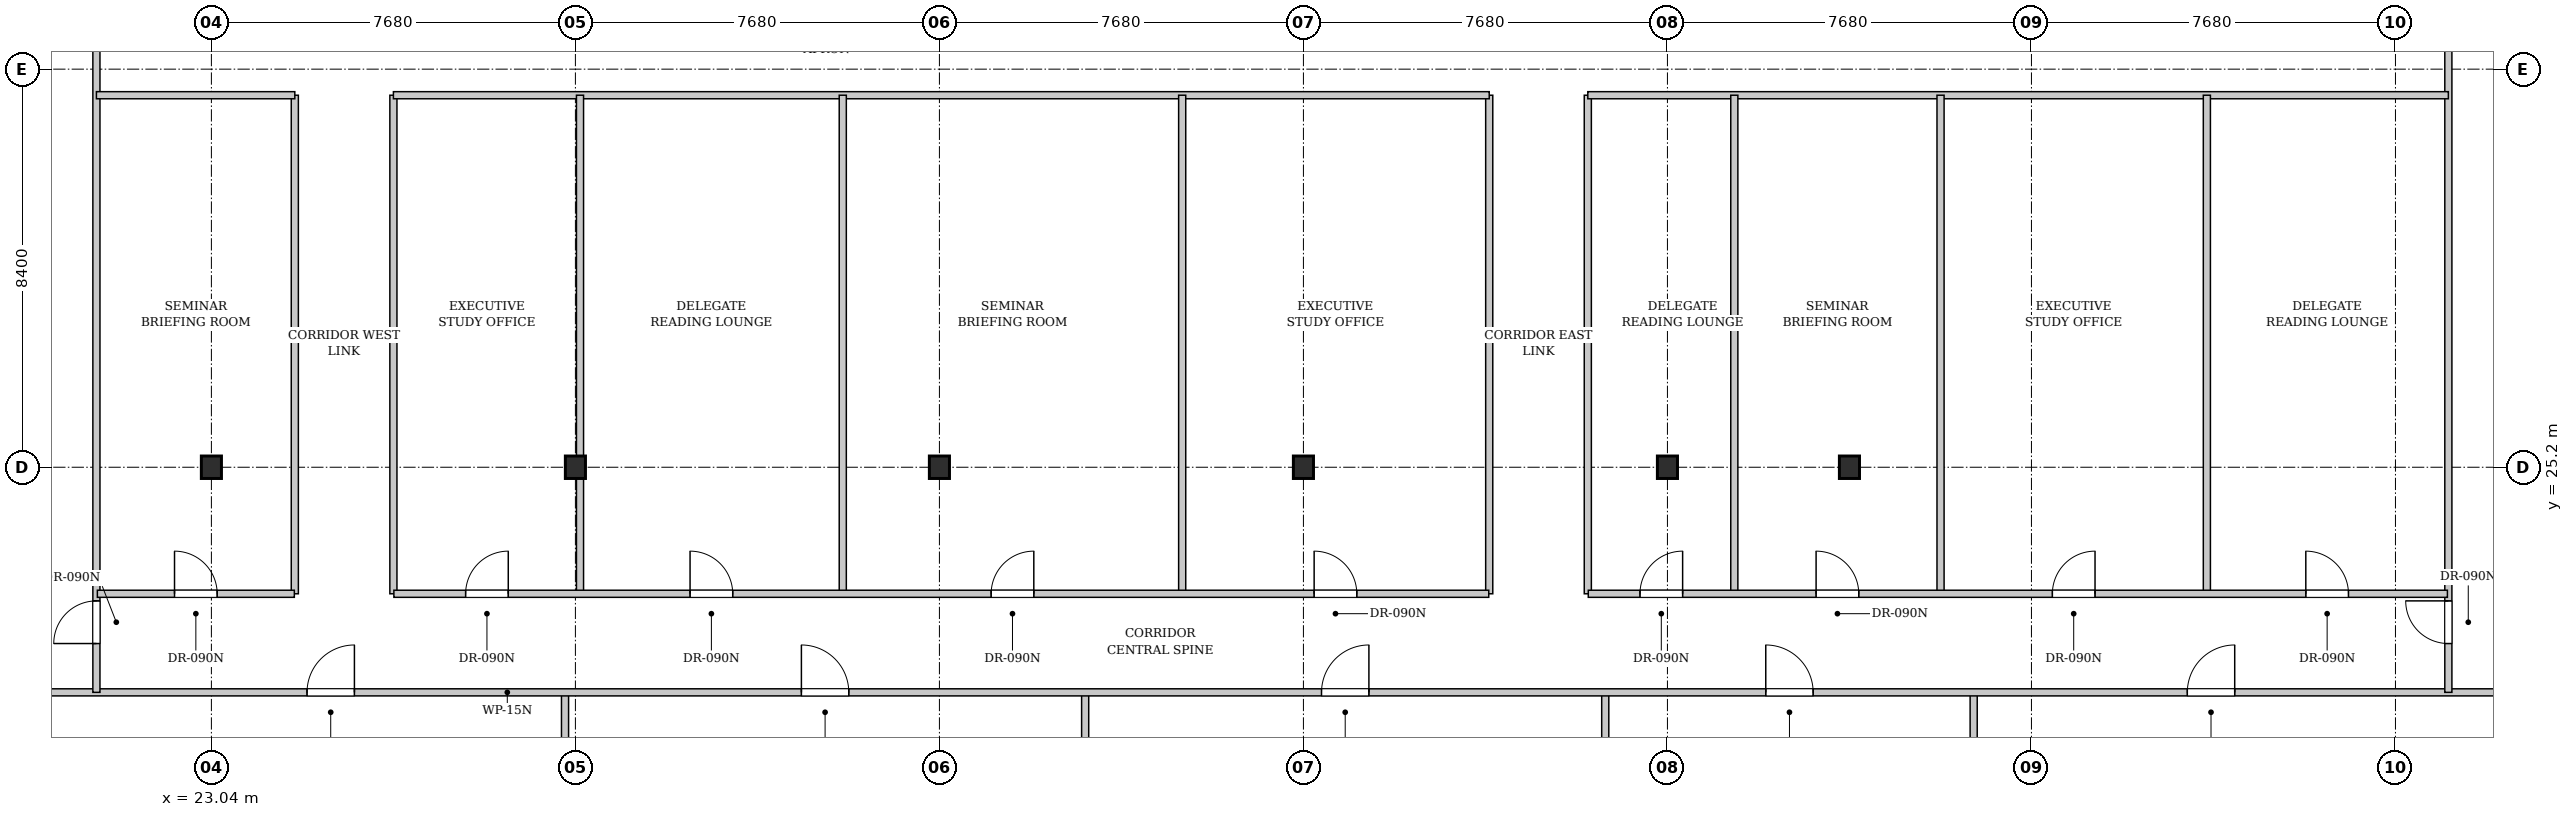
"""IFC4 building model, lengths in metres.
Left out: names, types, materials, properties, quantities, classifications, styles, units other than length and angle.
Written with IfcOpenShell. Run it as: python <this file> out.ifc"""

import sys

from ifc_helpers import new_model, si_unit, direction, frame, frame_2d, origin, origin_2d, place, context, subcontext, project, spatial, rectangle, i_section, extrude, element, fill, save


model = new_model("IFC4")
c1 = context("Model", 3, precision=1e-05, world=origin(), true_north=direction((0.0, 1.0)))
c2 = subcontext(c1, "Body", "Model", "MODEL_VIEW")
j1 = project(units=[si_unit("LENGTHUNIT", "METRE"), si_unit("PLANEANGLEUNIT", "RADIAN")], contexts=[c1])
p1 = place(None, origin())
s1 = spatial("IfcSite", under=j1, at=p1, CompositionType="ELEMENT")
p2 = place(p1, origin())
s2 = spatial("IfcBuilding", under=s1, at=p2, CompositionType="ELEMENT")
p3 = place(p2, frame((0.0, 0.0, 123.7)))
s3 = spatial("IfcBuildingStorey", under=s2, at=p3, CompositionType="ELEMENT", Elevation=123.7)
for number, where, z_axis, x_axis in (
    (1, (23.04, 25.2, 0.0), (0.0, 0.0, 1.0), (1.0, 0.0, 0.0)),
    (2, (30.72, 25.2, 0.0), (0.0, 0.0, 1.0), (1.0, 0.0, 0.0)),
    (3, (38.4, 25.2, 0.0), (0.0, 0.0, 1.0), (1.0, 0.0, 0.0)),
    (4, (46.08, 25.2, 0.0), (0.0, 0.0, 1.0), (1.0, 0.0, 0.0)),
    (5, (53.76, 25.2, 0.0), (0.0, 0.0, 1.0), (1.0, 0.0, 0.0)),
    (6, (57.6, 25.2, 0.0), (0.0, 0.0, 1.0), (1.0, 0.0, 0.0)),
):
    element("IfcColumn", number, at=place(p3, frame(where, z_axis=z_axis, x_axis=x_axis)), inside=s3, PredefinedType="COLUMN", context=c2, shape_type="SweptSolid", body=[
        extrude(i_section(OverallWidth=0.424, OverallDepth=0.474, WebThickness=0.047, FlangeThickness=0.077, FilletRadius=0.015, at=origin_2d()), origin(), (0.0, 0.0, 1.0), 3.4),
    ])
p4 = place(p3, frame((30.501, 9.604, 0.0), z_axis=(0.0, 0.0, 1.0), x_axis=(0.0, 1.0, 0.0)))
e7 = element("IfcWall", 7, at=p4, inside=s3, PredefinedType="PARTITIONING", context=c2, shape_type="SweptSolid", body=[
    extrude(rectangle(XDim=10.866, YDim=0.15, at=frame_2d((5.433, 0.0))), origin(), (0.0, 0.0, 1.0), 3.18),
])
p5 = place(p3, frame((41.475, 10.66, 0.0), z_axis=(0.0, 0.0, 1.0), x_axis=(0.0, 1.0, 0.0)))
e8 = element("IfcWall", 8, at=p5, inside=s3, PredefinedType="PARTITIONING", context=c2, shape_type="SweptSolid", body=[
    extrude(rectangle(XDim=9.81, YDim=0.15, at=frame_2d((4.905, 0.0))), origin(), (0.0, 0.0, 1.0), 3.18),
])
p6 = place(p3, frame((52.448, 11.717, 0.0), z_axis=(0.0, 0.0, 1.0), x_axis=(0.0, 1.0, 0.0)))
e9 = element("IfcWall", 9, at=p6, inside=s3, PredefinedType="PARTITIONING", context=c2, shape_type="SweptSolid", body=[
    extrude(rectangle(XDim=8.753, YDim=0.15, at=frame_2d((4.376, 0.0))), origin(), (0.0, 0.0, 1.0), 2.525),
])
p7 = place(p3, frame((60.221, 12.465, 0.0), z_axis=(0.0, 0.0, 1.0), x_axis=(0.0, 1.0, 0.0)))
e10 = element("IfcWall", 10, at=p7, inside=s3, PredefinedType="PARTITIONING", context=c2, shape_type="SweptSolid", body=[
    extrude(rectangle(XDim=8.005, YDim=0.15, at=frame_2d((4.002, 0.0))), origin(), (0.0, 0.0, 1.0), 3.18),
])
p8 = place(p3, frame((15.814, 20.45, 0.0), z_axis=(0.0, 0.0, 1.0), x_axis=(1.0, 0.0, 0.0)))
e11 = element("IfcWall", 11, at=p8, inside=s3, PredefinedType="PARTITIONING", context=c2, shape_type="SweptSolid", body=[
    extrude(rectangle(XDim=61.222, YDim=0.15, at=frame_2d((30.611, 0.0))), origin(), (0.0, 0.0, 1.0), 3.18),
])
p9 = place(p8, frame((9.243, 0.0, 0.0)))
e12 = element("IfcOpeningElement", 12, at=p9, cuts=e11, PredefinedType="OPENING", context=c2, shape_type="SweptSolid", body=[
    extrude(rectangle(XDim=1.0, YDim=2.15, at=frame_2d((0.5, 1.075))), frame((0.0, 0.085, 0.0), z_axis=(0.0, -1.0, 0.0), x_axis=(1.0, 0.0, 0.0)), (0.0, 0.0, 1.0), 0.17),
])
p10 = place(p8, frame((19.674, 0.0, 0.0)))
e13 = element("IfcOpeningElement", 13, at=p10, cuts=e11, PredefinedType="OPENING", context=c2, shape_type="SweptSolid", body=[
    extrude(rectangle(XDim=1.0, YDim=2.15, at=frame_2d((0.5, 1.075))), frame((0.0, 0.085, 0.0), z_axis=(0.0, -1.0, 0.0), x_axis=(1.0, 0.0, 0.0)), (0.0, 0.0, 1.0), 0.17),
])
p11 = place(p8, frame((30.647, 0.0, 0.0)))
e14 = element("IfcOpeningElement", 14, at=p11, cuts=e11, PredefinedType="OPENING", context=c2, shape_type="SweptSolid", body=[
    extrude(rectangle(XDim=1.0, YDim=2.15, at=frame_2d((0.5, 1.075))), frame((0.0, 0.085, 0.0), z_axis=(0.0, -1.0, 0.0), x_axis=(1.0, 0.0, 0.0)), (0.0, 0.0, 1.0), 0.17),
])
p12 = place(p8, frame((40.021, 0.0, 0.0)))
e15 = element("IfcOpeningElement", 15, at=p12, cuts=e11, PredefinedType="OPENING", context=c2, shape_type="SweptSolid", body=[
    extrude(rectangle(XDim=1.0, YDim=2.15, at=frame_2d((0.5, 1.075))), frame((0.0, 0.085, 0.0), z_axis=(0.0, -1.0, 0.0), x_axis=(1.0, 0.0, 0.0)), (0.0, 0.0, 1.0), 0.17),
])
p13 = place(p8, frame((48.914, 0.0, 0.0)))
e16 = element("IfcOpeningElement", 16, at=p13, cuts=e11, PredefinedType="OPENING", context=c2, shape_type="SweptSolid", body=[
    extrude(rectangle(XDim=1.0, YDim=2.15, at=frame_2d((0.5, 1.075))), frame((0.0, 0.085, 0.0), z_axis=(0.0, -1.0, 0.0), x_axis=(1.0, 0.0, 0.0)), (0.0, 0.0, 1.0), 0.17),
])
p14 = place(p3, frame((20.614, 20.45, 0.0), z_axis=(0.0, 0.0, 1.0), x_axis=(0.0, 1.0, 0.0)))
e17 = element("IfcWall", 17, at=p14, inside=s3, PredefinedType="PARTITIONING", context=c2, shape_type="SweptSolid", body=[
    extrude(rectangle(XDim=25.815, YDim=0.15, at=frame_2d((12.907, 0.0))), origin(), (0.0, 0.0, 1.0), 3.18),
])
p15 = place(p14, frame((1.03, 0.0, 0.0)))
e18 = element("IfcOpeningElement", 18, at=p15, cuts=e17, PredefinedType="OPENING", context=c2, shape_type="SweptSolid", body=[
    extrude(rectangle(XDim=0.9, YDim=2.15, at=frame_2d((0.45, 1.075))), frame((0.0, 0.085, 0.0), z_axis=(0.0, -1.0, 0.0), x_axis=(1.0, 0.0, 0.0)), (0.0, 0.0, 1.0), 0.17),
])
p16 = place(p3, frame((70.236, 20.45, 0.0), z_axis=(0.0, 0.0, 1.0), x_axis=(0.0, 1.0, 0.0)))
e19 = element("IfcWall", 19, at=p16, inside=s3, PredefinedType="PARTITIONING", context=c2, shape_type="SweptSolid", body=[
    extrude(rectangle(XDim=30.593, YDim=0.15, at=frame_2d((15.296, 0.0))), origin(), (0.0, 0.0, 1.0), 3.18),
])
p17 = place(p16, frame((1.03, 0.0, 0.0)))
e20 = element("IfcOpeningElement", 20, at=p17, cuts=e19, PredefinedType="OPENING", context=c2, shape_type="SweptSolid", body=[
    extrude(rectangle(XDim=0.9, YDim=2.15, at=frame_2d((0.45, 1.075))), frame((0.0, 0.085, 0.0), z_axis=(0.0, -1.0, 0.0), x_axis=(1.0, 0.0, 0.0)), (0.0, 0.0, 1.0), 0.17),
])
for number, where, z_axis, x_axis in (
    (21, (24.8, 22.53, 0.0), (0.0, 0.0, 1.0), (0.0, 1.0, 0.0)),
    (22, (26.88, 22.53, 0.0), (0.0, 0.0, 1.0), (0.0, 1.0, 0.0)),
    (23, (50.0, 22.53, 0.0), (0.0, 0.0, 1.0), (0.0, 1.0, 0.0)),
    (24, (52.08, 22.53, 0.0), (0.0, 0.0, 1.0), (0.0, 1.0, 0.0)),
):
    element("IfcWall", number, at=place(p3, frame(where, z_axis=z_axis, x_axis=x_axis)), inside=s3, PredefinedType="PARTITIONING", context=c2, shape_type="SweptSolid", body=[
        extrude(rectangle(XDim=10.52, YDim=0.15, at=frame_2d((5.26, 0.0))), origin(), (0.0, 0.0, 1.0), 3.18),
    ])
p18 = place(p3, frame((20.614, 33.05, 0.0), z_axis=(0.0, 0.0, 1.0), x_axis=(1.0, 0.0, 0.0)))
e25 = element("IfcWall", 25, at=p18, inside=s3, PredefinedType="PARTITIONING", context=c2, shape_type="SweptSolid", body=[
    extrude(rectangle(XDim=4.186, YDim=0.15, at=frame_2d((2.093, 0.0))), origin(), (0.0, 0.0, 1.0), 3.18),
])
p19 = place(p3, frame((26.88, 33.05, 0.0), z_axis=(0.0, 0.0, 1.0), x_axis=(1.0, 0.0, 0.0)))
e26 = element("IfcWall", 26, at=p19, inside=s3, PredefinedType="PARTITIONING", context=c2, shape_type="SweptSolid", body=[
    extrude(rectangle(XDim=23.12, YDim=0.15, at=frame_2d((11.56, 0.0))), origin(), (0.0, 0.0, 1.0), 3.18),
])
p20 = place(p3, frame((52.08, 33.05, 0.0), z_axis=(0.0, 0.0, 1.0), x_axis=(1.0, 0.0, 0.0)))
e27 = element("IfcWall", 27, at=p20, inside=s3, PredefinedType="PARTITIONING", context=c2, shape_type="SweptSolid", body=[
    extrude(rectangle(XDim=18.156, YDim=0.15, at=frame_2d((9.078, 0.0))), origin(), (0.0, 0.0, 1.0), 2.525),
])
p21 = place(p3, frame((20.634, 22.53, 0.0), z_axis=(0.0, 0.0, 1.0), x_axis=(1.0, 0.0, 0.0)))
e28 = element("IfcWall", 28, at=p21, inside=s3, PredefinedType="PARTITIONING", context=c2, shape_type="SweptSolid", body=[
    extrude(rectangle(XDim=4.156, YDim=0.15, at=frame_2d((2.078, 0.0))), origin(), (0.0, 0.0, 1.0), 3.18),
])
p22 = place(p21, frame((1.628, 0.0, 0.0)))
e29 = element("IfcOpeningElement", 29, at=p22, cuts=e28, PredefinedType="OPENING", context=c2, shape_type="SweptSolid", body=[
    extrude(rectangle(XDim=0.9, YDim=2.15, at=frame_2d((0.45, 1.075))), frame((0.0, 0.085, 0.0), z_axis=(0.0, -1.0, 0.0), x_axis=(1.0, 0.0, 0.0)), (0.0, 0.0, 1.0), 0.17),
])
p23 = place(p3, frame((30.817, 22.53, 0.0), z_axis=(0.0, 0.0, 1.0), x_axis=(0.0, 1.0, 0.0)))
e30 = element("IfcWall", 30, at=p23, inside=s3, PredefinedType="PARTITIONING", context=c2, shape_type="SweptSolid", body=[
    extrude(rectangle(XDim=10.52, YDim=0.15, at=frame_2d((5.26, 0.0))), origin(), (0.0, 0.0, 1.0), 2.525),
])
for number, where, z_axis, x_axis in (
    (31, (36.361, 22.53, 0.0), (0.0, 0.0, 1.0), (0.0, 1.0, 0.0)),
    (32, (43.522, 22.53, 0.0), (0.0, 0.0, 1.0), (0.0, 1.0, 0.0)),
):
    element("IfcWall", number, at=place(p3, frame(where, z_axis=z_axis, x_axis=x_axis)), inside=s3, PredefinedType="PARTITIONING", context=c2, shape_type="SweptSolid", body=[
        extrude(rectangle(XDim=10.52, YDim=0.15, at=frame_2d((5.26, 0.0))), origin(), (0.0, 0.0, 1.0), 3.18),
    ])
p24 = place(p3, frame((26.89, 22.53, 0.0), z_axis=(0.0, 0.0, 1.0), x_axis=(1.0, 0.0, 0.0)))
e33 = element("IfcWall", 33, at=p24, inside=s3, PredefinedType="PARTITIONING", context=c2, shape_type="SweptSolid", body=[
    extrude(rectangle(XDim=23.1, YDim=0.15, at=frame_2d((11.55, 0.0))), origin(), (0.0, 0.0, 1.0), 3.18),
])
p25 = place(p24, frame((1.513, 0.0, 0.0)))
e34 = element("IfcOpeningElement", 34, at=p25, cuts=e33, PredefinedType="OPENING", context=c2, shape_type="SweptSolid", body=[
    extrude(rectangle(XDim=0.9, YDim=2.15, at=frame_2d((0.45, 1.075))), frame((0.0, 0.085, 0.0), z_axis=(0.0, -1.0, 0.0), x_axis=(1.0, 0.0, 0.0)), (0.0, 0.0, 1.0), 0.17),
])
p26 = place(p24, frame((6.249, 0.0, 0.0)))
e35 = element("IfcOpeningElement", 35, at=p26, cuts=e33, PredefinedType="OPENING", context=c2, shape_type="SweptSolid", body=[
    extrude(rectangle(XDim=0.9, YDim=2.15, at=frame_2d((0.45, 1.075))), frame((0.0, 0.085, 0.0), z_axis=(0.0, -1.0, 0.0), x_axis=(1.0, 0.0, 0.0)), (0.0, 0.0, 1.0), 0.17),
])
p27 = place(p24, frame((12.602, 0.0, 0.0)))
e36 = element("IfcOpeningElement", 36, at=p27, cuts=e33, PredefinedType="OPENING", context=c2, shape_type="SweptSolid", body=[
    extrude(rectangle(XDim=0.9, YDim=2.15, at=frame_2d((0.45, 1.075))), frame((0.0, 0.085, 0.0), z_axis=(0.0, -1.0, 0.0), x_axis=(1.0, 0.0, 0.0)), (0.0, 0.0, 1.0), 0.17),
])
p28 = place(p24, frame((19.416, 0.0, 0.0)))
e37 = element("IfcOpeningElement", 37, at=p28, cuts=e33, PredefinedType="OPENING", context=c2, shape_type="SweptSolid", body=[
    extrude(rectangle(XDim=0.9, YDim=2.15, at=frame_2d((0.45, 1.075))), frame((0.0, 0.085, 0.0), z_axis=(0.0, -1.0, 0.0), x_axis=(1.0, 0.0, 0.0)), (0.0, 0.0, 1.0), 0.17),
])
for number, where, z_axis, x_axis in (
    (38, (55.171, 22.53, 0.0), (0.0, 0.0, 1.0), (0.0, 1.0, 0.0)),
    (39, (59.522, 22.53, 0.0), (0.0, 0.0, 1.0), (0.0, 1.0, 0.0)),
    (40, (65.141, 22.53, 0.0), (0.0, 0.0, 1.0), (0.0, 1.0, 0.0)),
):
    element("IfcWall", number, at=place(p3, frame(where, z_axis=z_axis, x_axis=x_axis)), inside=s3, PredefinedType="PARTITIONING", context=c2, shape_type="SweptSolid", body=[
        extrude(rectangle(XDim=10.52, YDim=0.15, at=frame_2d((5.26, 0.0))), origin(), (0.0, 0.0, 1.0), 3.18),
    ])
p29 = place(p3, frame((52.09, 22.53, 0.0), z_axis=(0.0, 0.0, 1.0), x_axis=(1.0, 0.0, 0.0)))
e41 = element("IfcWall", 41, at=p29, inside=s3, PredefinedType="PARTITIONING", context=c2, shape_type="SweptSolid", body=[
    extrude(rectangle(XDim=18.126, YDim=0.15, at=frame_2d((9.063, 0.0))), origin(), (0.0, 0.0, 1.0), 3.18),
])
p30 = place(p29, frame((1.091, 0.0, 0.0)))
e42 = element("IfcOpeningElement", 42, at=p30, cuts=e41, PredefinedType="OPENING", context=c2, shape_type="SweptSolid", body=[
    extrude(rectangle(XDim=0.9, YDim=2.15, at=frame_2d((0.45, 1.075))), frame((0.0, 0.085, 0.0), z_axis=(0.0, -1.0, 0.0), x_axis=(1.0, 0.0, 0.0)), (0.0, 0.0, 1.0), 0.17),
])
p31 = place(p29, frame((4.806, 0.0, 0.0)))
e43 = element("IfcOpeningElement", 43, at=p31, cuts=e41, PredefinedType="OPENING", context=c2, shape_type="SweptSolid", body=[
    extrude(rectangle(XDim=0.9, YDim=2.15, at=frame_2d((0.45, 1.075))), frame((0.0, 0.085, 0.0), z_axis=(0.0, -1.0, 0.0), x_axis=(1.0, 0.0, 0.0)), (0.0, 0.0, 1.0), 0.17),
])
p32 = place(p29, frame((9.792, 0.0, 0.0)))
e44 = element("IfcOpeningElement", 44, at=p32, cuts=e41, PredefinedType="OPENING", context=c2, shape_type="SweptSolid", body=[
    extrude(rectangle(XDim=0.9, YDim=2.15, at=frame_2d((0.45, 1.075))), frame((0.0, 0.085, 0.0), z_axis=(0.0, -1.0, 0.0), x_axis=(1.0, 0.0, 0.0)), (0.0, 0.0, 1.0), 0.17),
])
p33 = place(p29, frame((15.138, 0.0, 0.0)))
e45 = element("IfcOpeningElement", 45, at=p33, cuts=e41, PredefinedType="OPENING", context=c2, shape_type="SweptSolid", body=[
    extrude(rectangle(XDim=0.9, YDim=2.15, at=frame_2d((0.45, 1.075))), frame((0.0, 0.085, 0.0), z_axis=(0.0, -1.0, 0.0), x_axis=(1.0, 0.0, 0.0)), (0.0, 0.0, 1.0), 0.17),
])
p34 = place(p9, origin())
e46 = element("IfcDoor", 46, at=p34, inside=s3, OperationType="SINGLE_SWING_RIGHT", PredefinedType="DOOR", context=c2, shape_type="SweptSolid", body=[
    extrude(rectangle(XDim=1.0, YDim=2.15, at=frame_2d((0.5, 1.075))), frame((0.0, 0.025, 0.0), z_axis=(0.0, -1.0, 0.0), x_axis=(1.0, 0.0, 0.0)), (0.0, 0.0, 1.0), 0.05),
])
fill(e12, e46)
p35 = place(p10, origin())
e47 = element("IfcDoor", 47, at=p35, inside=s3, OperationType="SINGLE_SWING_LEFT", PredefinedType="DOOR", context=c2, shape_type="SweptSolid", body=[
    extrude(rectangle(XDim=1.0, YDim=2.15, at=frame_2d((0.5, 1.075))), frame((0.0, 0.025, 0.0), z_axis=(0.0, -1.0, 0.0), x_axis=(1.0, 0.0, 0.0)), (0.0, 0.0, 1.0), 0.05),
])
fill(e13, e47)
p36 = place(p11, origin())
e48 = element("IfcDoor", 48, at=p36, inside=s3, OperationType="SINGLE_SWING_RIGHT", PredefinedType="DOOR", context=c2, shape_type="SweptSolid", body=[
    extrude(rectangle(XDim=1.0, YDim=2.15, at=frame_2d((0.5, 1.075))), frame((0.0, 0.025, 0.0), z_axis=(0.0, -1.0, 0.0), x_axis=(1.0, 0.0, 0.0)), (0.0, 0.0, 1.0), 0.05),
])
fill(e14, e48)
p37 = place(p12, origin())
e49 = element("IfcDoor", 49, at=p37, inside=s3, OperationType="SINGLE_SWING_LEFT", PredefinedType="DOOR", context=c2, shape_type="SweptSolid", body=[
    extrude(rectangle(XDim=1.0, YDim=2.15, at=frame_2d((0.5, 1.075))), frame((0.0, 0.025, 0.0), z_axis=(0.0, -1.0, 0.0), x_axis=(1.0, 0.0, 0.0)), (0.0, 0.0, 1.0), 0.05),
])
fill(e15, e49)
p38 = place(p13, origin())
e50 = element("IfcDoor", 50, at=p38, inside=s3, OperationType="SINGLE_SWING_RIGHT", PredefinedType="DOOR", context=c2, shape_type="SweptSolid", body=[
    extrude(rectangle(XDim=1.0, YDim=2.15, at=frame_2d((0.5, 1.075))), frame((0.0, 0.025, 0.0), z_axis=(0.0, -1.0, 0.0), x_axis=(1.0, 0.0, 0.0)), (0.0, 0.0, 1.0), 0.05),
])
fill(e16, e50)
p39 = place(p15, origin())
e51 = element("IfcDoor", 51, at=p39, inside=s3, OperationType="SINGLE_SWING_LEFT", PredefinedType="DOOR", context=c2, shape_type="SweptSolid", body=[
    extrude(rectangle(XDim=0.9, YDim=2.15, at=frame_2d((0.45, 1.075))), frame((0.0, 0.025, 0.0), z_axis=(0.0, -1.0, 0.0), x_axis=(1.0, 0.0, 0.0)), (0.0, 0.0, 1.0), 0.05),
])
fill(e18, e51)
p40 = place(p17, origin())
e52 = element("IfcDoor", 52, at=p40, inside=s3, OperationType="SINGLE_SWING_RIGHT", PredefinedType="DOOR", context=c2, shape_type="SweptSolid", body=[
    extrude(rectangle(XDim=0.9, YDim=2.15, at=frame_2d((0.45, 1.075))), frame((0.0, 0.025, 0.0), z_axis=(0.0, -1.0, 0.0), x_axis=(1.0, 0.0, 0.0)), (0.0, 0.0, 1.0), 0.05),
])
fill(e20, e52)
p41 = place(p22, origin())
e53 = element("IfcDoor", 53, at=p41, inside=s3, OperationType="SINGLE_SWING_LEFT", PredefinedType="DOOR", context=c2, shape_type="SweptSolid", body=[
    extrude(rectangle(XDim=0.9, YDim=2.15, at=frame_2d((0.45, 1.075))), frame((0.0, 0.025, 0.0), z_axis=(0.0, -1.0, 0.0), x_axis=(1.0, 0.0, 0.0)), (0.0, 0.0, 1.0), 0.05),
])
fill(e29, e53)
p42 = place(p25, origin())
e54 = element("IfcDoor", 54, at=p42, inside=s3, OperationType="SINGLE_SWING_RIGHT", PredefinedType="DOOR", context=c2, shape_type="SweptSolid", body=[
    extrude(rectangle(XDim=0.9, YDim=2.15, at=frame_2d((0.45, 1.075))), frame((0.0, 0.025, 0.0), z_axis=(0.0, -1.0, 0.0), x_axis=(1.0, 0.0, 0.0)), (0.0, 0.0, 1.0), 0.05),
])
fill(e34, e54)
p43 = place(p26, origin())
e55 = element("IfcDoor", 55, at=p43, inside=s3, OperationType="SINGLE_SWING_LEFT", PredefinedType="DOOR", context=c2, shape_type="SweptSolid", body=[
    extrude(rectangle(XDim=0.9, YDim=2.15, at=frame_2d((0.45, 1.075))), frame((0.0, 0.025, 0.0), z_axis=(0.0, -1.0, 0.0), x_axis=(1.0, 0.0, 0.0)), (0.0, 0.0, 1.0), 0.05),
])
fill(e35, e55)
p44 = place(p27, origin())
e56 = element("IfcDoor", 56, at=p44, inside=s3, OperationType="SINGLE_SWING_RIGHT", PredefinedType="DOOR", context=c2, shape_type="SweptSolid", body=[
    extrude(rectangle(XDim=0.9, YDim=2.15, at=frame_2d((0.45, 1.075))), frame((0.0, 0.025, 0.0), z_axis=(0.0, -1.0, 0.0), x_axis=(1.0, 0.0, 0.0)), (0.0, 0.0, 1.0), 0.05),
])
fill(e36, e56)
p45 = place(p28, origin())
e57 = element("IfcDoor", 57, at=p45, inside=s3, OperationType="SINGLE_SWING_LEFT", PredefinedType="DOOR", context=c2, shape_type="SweptSolid", body=[
    extrude(rectangle(XDim=0.9, YDim=2.15, at=frame_2d((0.45, 1.075))), frame((0.0, 0.025, 0.0), z_axis=(0.0, -1.0, 0.0), x_axis=(1.0, 0.0, 0.0)), (0.0, 0.0, 1.0), 0.05),
])
fill(e37, e57)
p46 = place(p30, origin())
e58 = element("IfcDoor", 58, at=p46, inside=s3, OperationType="SINGLE_SWING_RIGHT", PredefinedType="DOOR", context=c2, shape_type="SweptSolid", body=[
    extrude(rectangle(XDim=0.9, YDim=2.15, at=frame_2d((0.45, 1.075))), frame((0.0, 0.025, 0.0), z_axis=(0.0, -1.0, 0.0), x_axis=(1.0, 0.0, 0.0)), (0.0, 0.0, 1.0), 0.05),
])
fill(e42, e58)
p47 = place(p31, origin())
e59 = element("IfcDoor", 59, at=p47, inside=s3, OperationType="SINGLE_SWING_LEFT", PredefinedType="DOOR", context=c2, shape_type="SweptSolid", body=[
    extrude(rectangle(XDim=0.9, YDim=2.15, at=frame_2d((0.45, 1.075))), frame((0.0, 0.025, 0.0), z_axis=(0.0, -1.0, 0.0), x_axis=(1.0, 0.0, 0.0)), (0.0, 0.0, 1.0), 0.05),
])
fill(e43, e59)
p48 = place(p32, origin())
e60 = element("IfcDoor", 60, at=p48, inside=s3, OperationType="SINGLE_SWING_RIGHT", PredefinedType="DOOR", context=c2, shape_type="SweptSolid", body=[
    extrude(rectangle(XDim=0.9, YDim=2.15, at=frame_2d((0.45, 1.075))), frame((0.0, 0.025, 0.0), z_axis=(0.0, -1.0, 0.0), x_axis=(1.0, 0.0, 0.0)), (0.0, 0.0, 1.0), 0.05),
])
fill(e44, e60)
p49 = place(p33, origin())
e61 = element("IfcDoor", 61, at=p49, inside=s3, OperationType="SINGLE_SWING_LEFT", PredefinedType="DOOR", context=c2, shape_type="SweptSolid", body=[
    extrude(rectangle(XDim=0.9, YDim=2.15, at=frame_2d((0.45, 1.075))), frame((0.0, 0.025, 0.0), z_axis=(0.0, -1.0, 0.0), x_axis=(1.0, 0.0, 0.0)), (0.0, 0.0, 1.0), 0.05),
])
fill(e45, e61)
save(model, sys.argv[1])
